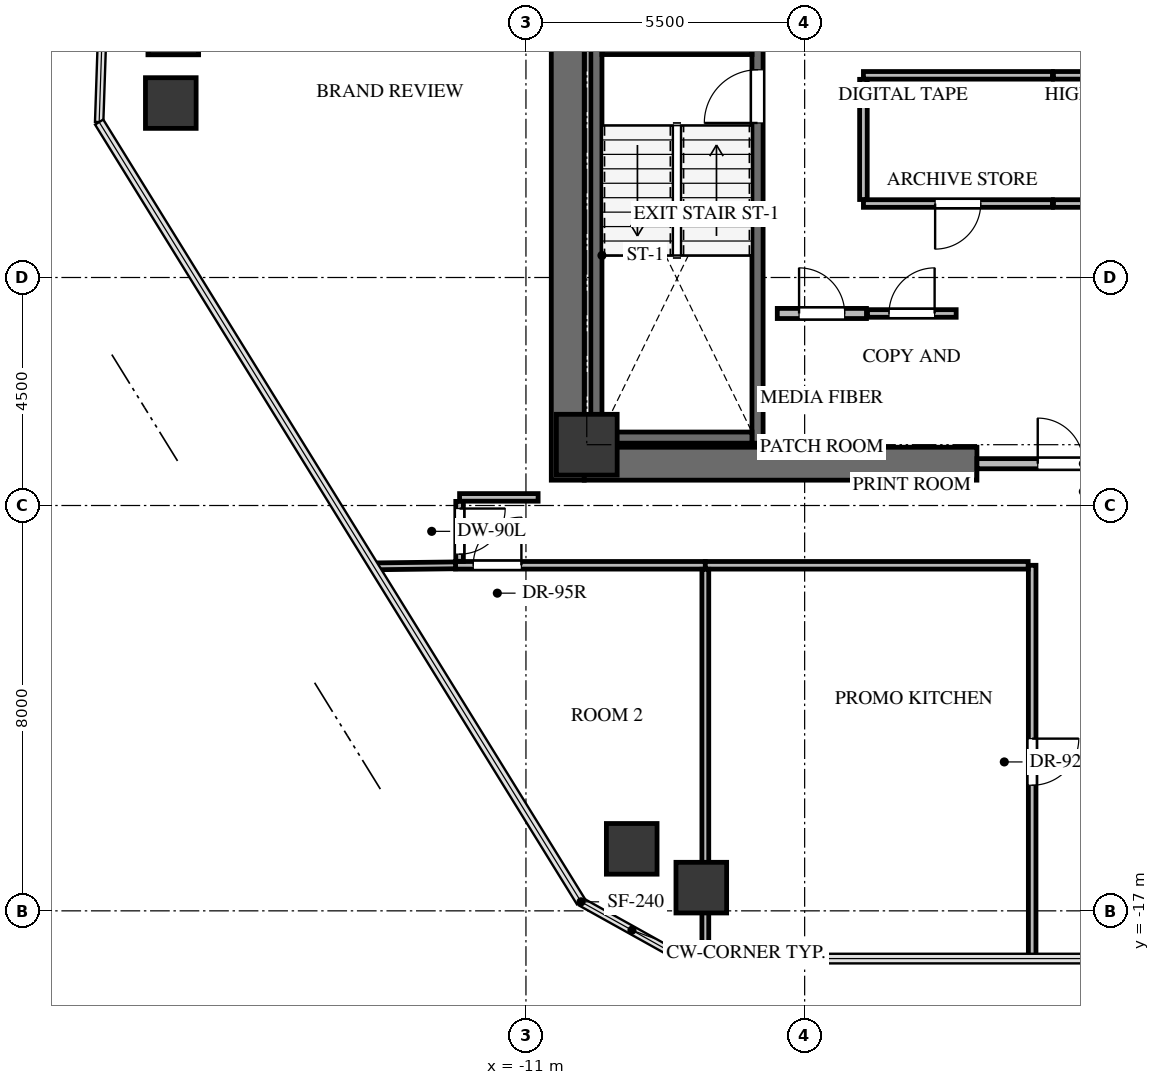
"""IFC4 building model, lengths in metres.
Left out: names, types, materials, properties, quantities, classifications, styles, units other than length and angle.
Written with IfcOpenShell. Run it as: python <this file> out.ifc"""

import sys

from ifc_helpers import new_model, si_unit, direction, frame, frame_2d, origin, origin_2d, place, context, subcontext, project, spatial, rectangle, extrude, source, transform, mapped, element, fill, save


model = new_model("IFC4")
c1 = context("Model", 3, precision=1e-05, world=origin(), true_north=direction((0.0, 1.0)))
c2 = subcontext(c1, "Body", "Model", "MODEL_VIEW")
j1 = project(units=[si_unit("LENGTHUNIT", "METRE"), si_unit("PLANEANGLEUNIT", "RADIAN")], contexts=[c1])
p1 = place(None, origin())
s1 = spatial("IfcSite", under=j1, at=p1, CompositionType="ELEMENT")
p2 = place(p1, origin())
s2 = spatial("IfcBuilding", under=s1, at=p2, CompositionType="ELEMENT")
p3 = place(p2, frame((0.0, 0.0, 193.6)))
s3 = spatial("IfcBuildingStorey", under=s2, at=p3, CompositionType="ELEMENT", Elevation=193.6)
p4 = place(p3, frame((-10.175, -8.5, 0.0), z_axis=(0.0, 0.0, 1.0), x_axis=(0.0, 1.0, 0.0)))
e1 = element("IfcWall", 1, at=p4, inside=s3, PredefinedType="SHEAR", context=c2, shape_type="SweptSolid", body=[
    extrude(rectangle(XDim=17.0, YDim=0.65, at=frame_2d((8.5, 0.0))), origin(), (0.0, 0.0, 1.0), 3.3),
])
p5 = place(p3, frame((-9.85, -8.175, 0.0), z_axis=(0.0, 0.0, 1.0), x_axis=(1.0, 0.0, 0.0)))
e2 = element("IfcWall", 2, at=p5, inside=s3, PredefinedType="SHEAR", context=c2, shape_type="SweptSolid", body=[
    extrude(rectangle(XDim=7.75, YDim=0.65, at=frame_2d((3.875, 0.0))), origin(), (0.0, 0.0, 1.0), 3.3),
])
p6 = place(p3, frame((-6.43, -7.77, -0.24), z_axis=(0.0, 0.0, 1.0), x_axis=(0.0, 1.0, 0.0)))
e3 = element("IfcWall", 3, at=p6, inside=s3, PredefinedType="SHEAR", context=c2, shape_type="SweptSolid", body=[
    extrude(rectangle(XDim=7.89, YDim=0.22, at=frame_2d((3.945, 0.0))), origin(), (0.0, 0.0, 1.0), 3.3),
])
p7 = place(p6, frame((6.32, 0.0, 0.0)))
e4 = element("IfcOpeningElement", 4, at=p7, cuts=e3, PredefinedType="OPENING", context=c2, shape_type="SweptSolid", body=[
    extrude(rectangle(XDim=1.05, YDim=2.15, at=frame_2d((0.525, 1.075))), frame((0.0, 0.12, 0.0), z_axis=(0.0, -1.0, 0.0), x_axis=(1.0, 0.0, 0.0)), (0.0, 0.0, 1.0), 0.24),
])
p8 = place(p3, frame((-9.61, 0.12, -0.24), z_axis=(0.0, 0.0, 1.0), x_axis=(0.0, -1.0, 0.0)))
e5 = element("IfcWall", 5, at=p8, inside=s3, PredefinedType="SHEAR", context=c2, shape_type="SweptSolid", body=[
    extrude(rectangle(XDim=7.89, YDim=0.22, at=frame_2d((3.945, 0.0))), origin(), (0.0, 0.0, 1.0), 3.3),
])
for number, where, z_axis, x_axis in (
    (6, (-9.5, -7.66, -0.24), (0.0, 0.0, 1.0), (1.0, 0.0, 0.0)),
    (7, (-6.54, 0.01, -0.24), (0.0, 0.0, 1.0), (-1.0, 0.0, 0.0)),
):
    element("IfcWall", number, at=place(p3, frame(where, z_axis=z_axis, x_axis=x_axis)), inside=s3, PredefinedType="SHEAR", context=c2, shape_type="SweptSolid", body=[
        extrude(rectangle(XDim=2.96, YDim=0.22, at=frame_2d((1.48, 0.0))), origin(), (0.0, 0.0, 1.0), 3.3),
    ])
m1 = source(origin(), c2, "Body", "SweptSolid", [
    extrude(rectangle(XDim=1.2, YDim=1.2, at=origin_2d()), origin(), (0.0, 0.0, 1.0), 3.3),
])
p9 = place(p3, frame((-9.8, -7.8, -0.24), z_axis=(0.0, 0.0, 1.0), x_axis=(1.0, 0.0, 0.0)))
e8 = element("IfcColumn", 8, at=p9, inside=s3, PredefinedType="COLUMN", context=c2, shape_type="MappedRepresentation", body=[
    mapped(m1, transform((0.0, 0.0, 0.0), x_axis=(1.0, 0.0, 0.0), y_axis=(0.0, 1.0, 0.0), z_axis=(0.0, 0.0, 1.0), scale=1.0)),
])
m2 = source(origin(), c2, "Body", "SweptSolid", [
    extrude(rectangle(XDim=1.0, YDim=1.0, at=origin_2d()), origin(), (0.0, 0.0, 1.0), 3.3),
])
for number, where, z_axis, x_axis in (
    (9, (-8.913, -15.776, -0.24), (0.0, 0.0, 1.0), (1.0, 0.0, 0.0)),
    (10, (-18.009, -1.057, -0.24), (0.0, 0.0, 1.0), (1.0, 0.0, 0.0)),
    (11, (-17.96, 0.396, -0.24), (0.0, 0.0, 1.0), (1.0, 0.0, 0.0)),
    (12, (-7.54, -16.542, -0.24), (0.0, 0.0, 1.0), (1.0, 0.0, 0.0)),
):
    element("IfcColumn", number, at=place(p3, frame(where, z_axis=z_axis, x_axis=x_axis)), inside=s3, PredefinedType="COLUMN", context=c2, shape_type="MappedRepresentation", body=[
        mapped(m2, transform((0.0, 0.0, 0.0), x_axis=(1.0, 0.0, 0.0), y_axis=(0.0, 1.0, 0.0), z_axis=(0.0, 0.0, 1.0), scale=1.0)),
    ])
p10 = place(p3, frame((-2.1, -8.175, 0.0), z_axis=(0.0, 0.0, 1.0), x_axis=(1.0, 0.0, 0.0)))
e13 = element("IfcWall", 13, at=p10, inside=s3, PredefinedType="SOLIDWALL", context=c2, shape_type="SweptSolid", body=[
    extrude(rectangle(XDim=4.2, YDim=0.2, at=frame_2d((2.1, 0.0))), origin(), (0.0, 0.0, 1.0), 3.045),
])
p11 = place(p10, frame((1.2, 0.0, 0.0)))
e14 = element("IfcOpeningElement", 14, at=p11, cuts=e13, PredefinedType="OPENING", context=c2, shape_type="SweptSolid", body=[
    extrude(rectangle(XDim=1.8, YDim=2.15, at=frame_2d((0.9, 1.075))), frame((0.0, 0.11, 0.0), z_axis=(0.0, -1.0, 0.0), x_axis=(1.0, 0.0, 0.0)), (0.0, 0.0, 1.0), 0.22),
])
p12 = place(p3, frame((-6.04, -5.21, 0.0), z_axis=(0.0, 0.0, 1.0), x_axis=(1.0, 0.0, 0.0)))
e15 = element("IfcWall", 15, at=p12, inside=s3, PredefinedType="SOLIDWALL", context=c2, shape_type="SweptSolid", body=[
    extrude(rectangle(XDim=1.76, YDim=0.2, at=frame_2d((0.88, 0.0))), origin(), (0.0, 0.0, 1.0), 3.045),
])
p13 = place(p12, frame((0.43, 0.0, 0.0)))
e16 = element("IfcOpeningElement", 16, at=p13, cuts=e15, PredefinedType="OPENING", context=c2, shape_type="SweptSolid", body=[
    extrude(rectangle(XDim=0.9, YDim=2.05, at=frame_2d((0.45, 1.025))), frame((0.0, 0.11, 0.0), z_axis=(0.0, -1.0, 0.0), x_axis=(1.0, 0.0, 0.0)), (0.0, 0.0, 1.0), 0.22),
])
p14 = place(p3, frame((-4.26, -5.21, 0.0), z_axis=(0.0, 0.0, 1.0), x_axis=(1.0, 0.0, 0.0)))
e17 = element("IfcWall", 17, at=p14, inside=s3, PredefinedType="PARTITIONING", context=c2, shape_type="SweptSolid", body=[
    extrude(rectangle(XDim=1.75, YDim=0.15, at=frame_2d((0.875, 0.0))), origin(), (0.0, 0.0, 1.0), 3.045),
])
p15 = place(p14, frame((0.425, 0.0, 0.0)))
e18 = element("IfcOpeningElement", 18, at=p15, cuts=e17, PredefinedType="OPENING", context=c2, shape_type="SweptSolid", body=[
    extrude(rectangle(XDim=0.9, YDim=2.05, at=frame_2d((0.45, 1.025))), frame((0.0, 0.085, 0.0), z_axis=(0.0, -1.0, 0.0), x_axis=(1.0, 0.0, 0.0)), (0.0, 0.0, 1.0), 0.17),
])
p16 = place(p3, frame((-0.61, -3.04, 0.0), z_axis=(0.0, 0.0, 1.0), x_axis=(-1.0, 0.0, 0.0)))
e19 = element("IfcWall", 19, at=p16, inside=s3, PredefinedType="PARTITIONING", context=c2, shape_type="SweptSolid", body=[
    extrude(rectangle(XDim=3.73, YDim=0.15, at=frame_2d((1.865, 0.0))), origin(), (0.0, 0.0, 1.0), 3.045),
])
p17 = place(p16, frame((1.415, 0.0, 0.0)))
e20 = element("IfcOpeningElement", 20, at=p17, cuts=e19, PredefinedType="OPENING", context=c2, shape_type="SweptSolid", body=[
    extrude(rectangle(XDim=0.9, YDim=2.05, at=frame_2d((0.45, 1.025))), frame((0.0, 0.085, 0.0), z_axis=(0.0, -1.0, 0.0), x_axis=(1.0, 0.0, 0.0)), (0.0, 0.0, 1.0), 0.17),
])
p18 = place(p3, frame((-4.34, -0.51, 0.0), z_axis=(0.0, 0.0, 1.0), x_axis=(1.0, 0.0, 0.0)))
e21 = element("IfcWall", 21, at=p18, inside=s3, PredefinedType="PARTITIONING", context=c2, shape_type="SweptSolid", body=[
    extrude(rectangle(XDim=3.73, YDim=0.15, at=frame_2d((1.865, 0.0))), origin(), (0.0, 0.0, 1.0), 3.045),
])
p19 = place(p3, frame((-4.34, -2.961, 0.0), z_axis=(0.0, 0.0, 1.0), x_axis=(0.0, 1.0, 0.0)))
e22 = element("IfcWall", 22, at=p19, inside=s3, PredefinedType="PARTITIONING", context=c2, shape_type="SweptSolid", body=[
    extrude(rectangle(XDim=2.372, YDim=0.15, at=frame_2d((1.186, 0.0))), origin(), (0.0, 0.0, 1.0), 3.045),
])
p20 = place(p3, frame((3.14, -3.04, 0.0), z_axis=(0.0, 0.0, 1.0), x_axis=(-1.0, 0.0, 0.0)))
e23 = element("IfcWall", 23, at=p20, inside=s3, PredefinedType="PARTITIONING", context=c2, shape_type="SweptSolid", body=[
    extrude(rectangle(XDim=3.73, YDim=0.15, at=frame_2d((1.865, 0.0))), origin(), (0.0, 0.0, 1.0), 3.045),
])
p21 = place(p20, frame((1.415, 0.0, 0.0)))
e24 = element("IfcOpeningElement", 24, at=p21, cuts=e23, PredefinedType="OPENING", context=c2, shape_type="SweptSolid", body=[
    extrude(rectangle(XDim=0.9, YDim=2.05, at=frame_2d((0.45, 1.025))), frame((0.0, 0.085, 0.0), z_axis=(0.0, -1.0, 0.0), x_axis=(1.0, 0.0, 0.0)), (0.0, 0.0, 1.0), 0.17),
])
p22 = place(p3, frame((-0.59, -0.51, 0.0), z_axis=(0.0, 0.0, 1.0), x_axis=(1.0, 0.0, 0.0)))
e25 = element("IfcWall", 25, at=p22, inside=s3, PredefinedType="PARTITIONING", context=c2, shape_type="SweptSolid", body=[
    extrude(rectangle(XDim=3.73, YDim=0.15, at=frame_2d((1.865, 0.0))), origin(), (0.0, 0.0, 1.0), 3.045),
])
p23 = place(p3, frame((-12.39, -10.18, 0.0), z_axis=(0.0, 0.0, 1.0), x_axis=(1.0, 0.0, 0.0)))
e26 = element("IfcWall", 26, at=p23, inside=s3, PredefinedType="PARTITIONING", context=c2, shape_type="SweptSolid", body=[
    extrude(rectangle(XDim=4.93, YDim=0.15, at=frame_2d((2.465, 0.0))), origin(), (0.0, 0.0, 1.0), 2.399),
])
p24 = place(p23, frame((0.35, 0.0, 0.0)))
e27 = element("IfcOpeningElement", 27, at=p24, cuts=e26, PredefinedType="OPENING", context=c2, shape_type="SweptSolid", body=[
    extrude(rectangle(XDim=0.95, YDim=2.1, at=frame_2d((0.475, 1.05))), frame((0.0, 0.085, 0.0), z_axis=(0.0, -1.0, 0.0), x_axis=(1.0, 0.0, 0.0)), (0.0, 0.0, 1.0), 0.17),
])
p25 = place(p3, frame((-1.01, -10.18, 0.0), z_axis=(0.0, 0.0, 1.0), x_axis=(0.0, -1.0, 0.0)))
e28 = element("IfcWall", 28, at=p25, inside=s3, PredefinedType="PARTITIONING", context=c2, shape_type="SweptSolid", body=[
    extrude(rectangle(XDim=7.762, YDim=0.15, at=frame_2d((3.881, 0.0))), origin(), (0.0, 0.0, 1.0), 2.399),
])
p26 = place(p25, frame((3.421, 0.0, 0.0)))
e29 = element("IfcOpeningElement", 29, at=p26, cuts=e28, PredefinedType="OPENING", context=c2, shape_type="SweptSolid", body=[
    extrude(rectangle(XDim=0.92, YDim=2.1, at=frame_2d((0.46, 1.05))), frame((0.0, 0.085, 0.0), z_axis=(0.0, -1.0, 0.0), x_axis=(1.0, 0.0, 0.0)), (0.0, 0.0, 1.0), 0.17),
])
p27 = place(p3, frame((-7.46, -10.18, 0.0), z_axis=(0.0, 0.0, 1.0), x_axis=(1.0, 0.0, 0.0)))
e30 = element("IfcWall", 30, at=p27, inside=s3, PredefinedType="PARTITIONING", context=c2, shape_type="SweptSolid", body=[
    extrude(rectangle(XDim=6.371, YDim=0.15, at=frame_2d((3.186, 0.0))), origin(), (0.0, 0.0, 1.0), 2.242),
])
p28 = place(p3, frame((-10.76, -8.84, 0.0), z_axis=(0.0, 0.0, 1.0), x_axis=(-1.0, 0.0, 0.0)))
e31 = element("IfcWall", 31, at=p28, inside=s3, PredefinedType="PARTITIONING", context=c2, shape_type="SweptSolid", body=[
    extrude(rectangle(XDim=1.55, YDim=0.15, at=frame_2d((0.775, 0.0))), origin(), (0.0, 0.0, 1.0), 3.045),
])
p29 = place(p3, frame((-12.31, -8.919, 0.0), z_axis=(0.0, 0.0, 1.0), x_axis=(0.0, -1.0, 0.0)))
e32 = element("IfcWall", 32, at=p29, inside=s3, PredefinedType="PARTITIONING", context=c2, shape_type="SweptSolid", body=[
    extrude(rectangle(XDim=1.182, YDim=0.15, at=frame_2d((0.591, 0.0))), origin(), (0.0, 0.0, 1.0), 2.399),
])
p30 = place(p29, frame((0.141, 0.0, 0.0)))
e33 = element("IfcOpeningElement", 33, at=p30, cuts=e32, PredefinedType="OPENING", context=c2, shape_type="SweptSolid", body=[
    extrude(rectangle(XDim=0.9, YDim=2.05, at=frame_2d((0.45, 1.025))), frame((0.0, 0.085, 0.0), z_axis=(0.0, -1.0, 0.0), x_axis=(1.0, 0.0, 0.0)), (0.0, 0.0, 1.0), 0.17),
])
p31 = place(p3, frame((-7.46, -10.259, 0.0), z_axis=(0.0, 0.0, 1.0), x_axis=(0.0, -1.0, 0.0)))
e34 = element("IfcWall", 34, at=p31, inside=s3, PredefinedType="PARTITIONING", context=c2, shape_type="SweptSolid", body=[
    extrude(rectangle(XDim=6.367, YDim=0.135, at=frame_2d((3.184, 0.0))), origin(), (0.0, 0.0, 1.0), 2.242),
])
p32 = place(p3, frame((-7.46, -16.626, 0.0), z_axis=(0.0, 0.0, 1.0), x_axis=(0.0, -1.0, 0.0)))
e35 = element("IfcWall", 35, at=p32, inside=s3, PredefinedType="PARTITIONING", context=c2, shape_type="SweptSolid", body=[
    extrude(rectangle(XDim=1.316, YDim=0.135, at=frame_2d((0.658, 0.0))), origin(), (0.0, 0.0, 1.0), 1.877),
])
p33 = place(p3, frame((-14.004, -10.201, 0.0), z_axis=(0.0, 0.0, 1.0), x_axis=(0.999923084603, 0.012402615782, 0.0)))
e36 = element("IfcWall", 36, at=p33, inside=s3, PredefinedType="PARTITIONING", context=c2, shape_type="SweptSolid", body=[
    extrude(rectangle(XDim=1.614, YDim=0.135, at=frame_2d((0.807, 0.0))), origin(), (0.0, 0.0, 1.0), 2.399),
])
m3 = source(origin(), c2, "Body", "SweptSolid", [
    extrude(rectangle(XDim=1.05, YDim=2.15, at=frame_2d((0.525, 1.075))), frame((0.0, 0.025, 0.0), z_axis=(0.0, -1.0, 0.0), x_axis=(1.0, 0.0, 0.0)), (0.0, 0.0, 1.0), 0.05),
])
p34 = place(p7, origin())
e37 = element("IfcDoor", 37, at=p34, inside=s3, OperationType="SINGLE_SWING_LEFT", PredefinedType="DOOR", context=c2, shape_type="MappedRepresentation", body=[
    mapped(m3, transform((0.0, 0.0, 0.0), x_axis=(1.0, 0.0, 0.0), y_axis=(0.0, 1.0, 0.0), z_axis=(0.0, 0.0, 1.0), scale=1.0)),
])
fill(e4, e37)
m4 = source(origin(), c2, "Body", "SweptSolid", [
    extrude(rectangle(XDim=1.8, YDim=2.15, at=frame_2d((0.9, 1.075))), frame((0.0, 0.025, 0.0), z_axis=(0.0, -1.0, 0.0), x_axis=(1.0, 0.0, 0.0)), (0.0, 0.0, 1.0), 0.05),
])
p35 = place(p11, origin())
e38 = element("IfcDoor", 38, at=p35, inside=s3, OperationType="DOUBLE_DOOR_SINGLE_SWING", PredefinedType="DOOR", context=c2, shape_type="MappedRepresentation", body=[
    mapped(m4, transform((0.0, 0.0, 0.0), x_axis=(1.0, 0.0, 0.0), y_axis=(0.0, 1.0, 0.0), z_axis=(0.0, 0.0, 1.0), scale=1.0)),
])
fill(e14, e38)
m5 = source(origin(), c2, "Body", "SweptSolid", [
    extrude(rectangle(XDim=0.9, YDim=2.05, at=frame_2d((0.45, 1.025))), frame((0.0, 0.025, 0.0), z_axis=(0.0, -1.0, 0.0), x_axis=(1.0, 0.0, 0.0)), (0.0, 0.0, 1.0), 0.05),
])
p36 = place(p13, origin())
e39 = element("IfcDoor", 39, at=p36, inside=s3, OperationType="SINGLE_SWING_LEFT", PredefinedType="DOOR", context=c2, shape_type="MappedRepresentation", body=[
    mapped(m5, transform((0.0, 0.0, 0.0), x_axis=(1.0, 0.0, 0.0), y_axis=(0.0, 1.0, 0.0), z_axis=(0.0, 0.0, 1.0), scale=1.0)),
])
fill(e16, e39)
m6 = source(origin(), c2, "Body", "SweptSolid", [
    extrude(rectangle(XDim=0.9, YDim=2.05, at=frame_2d((0.45, 1.025))), frame((0.0, 0.025, 0.0), z_axis=(0.0, -1.0, 0.0), x_axis=(1.0, 0.0, 0.0)), (0.0, 0.0, 1.0), 0.05),
])
p37 = place(p15, origin())
e40 = element("IfcDoor", 40, at=p37, inside=s3, OperationType="SINGLE_SWING_RIGHT", PredefinedType="DOOR", context=c2, shape_type="MappedRepresentation", body=[
    mapped(m6, transform((0.0, 0.0, 0.0), x_axis=(1.0, 0.0, 0.0), y_axis=(0.0, 1.0, 0.0), z_axis=(0.0, 0.0, 1.0), scale=1.0)),
])
fill(e18, e40)
p38 = place(p17, origin())
e41 = element("IfcDoor", 41, at=p38, inside=s3, OperationType="SINGLE_SWING_RIGHT", PredefinedType="DOOR", context=c2, shape_type="MappedRepresentation", body=[
    mapped(m6, transform((0.0, 0.0, 0.0), x_axis=(1.0, 0.0, 0.0), y_axis=(0.0, 1.0, 0.0), z_axis=(0.0, 0.0, 1.0), scale=1.0)),
])
fill(e20, e41)
m7 = source(origin(), c2, "Body", "SweptSolid", [
    extrude(rectangle(XDim=0.95, YDim=2.1, at=frame_2d((0.475, 1.05))), frame((0.0, 0.025, 0.0), z_axis=(0.0, -1.0, 0.0), x_axis=(1.0, 0.0, 0.0)), (0.0, 0.0, 1.0), 0.05),
])
p39 = place(p24, origin())
e42 = element("IfcDoor", 42, at=p39, inside=s3, OperationType="SINGLE_SWING_RIGHT", PredefinedType="DOOR", context=c2, shape_type="MappedRepresentation", body=[
    mapped(m7, transform((0.0, 0.0, 0.0), x_axis=(1.0, 0.0, 0.0), y_axis=(0.0, 1.0, 0.0), z_axis=(0.0, 0.0, 1.0), scale=1.0)),
])
fill(e27, e42)
m8 = source(origin(), c2, "Body", "SweptSolid", [
    extrude(rectangle(XDim=0.92, YDim=2.1, at=frame_2d((0.46, 1.05))), frame((0.0, 0.025, 0.0), z_axis=(0.0, -1.0, 0.0), x_axis=(1.0, 0.0, 0.0)), (0.0, 0.0, 1.0), 0.05),
])
p40 = place(p26, origin())
e43 = element("IfcDoor", 43, at=p40, inside=s3, OperationType="SINGLE_SWING_LEFT", PredefinedType="DOOR", context=c2, shape_type="MappedRepresentation", body=[
    mapped(m8, transform((0.0, 0.0, 0.0), x_axis=(1.0, 0.0, 0.0), y_axis=(0.0, 1.0, 0.0), z_axis=(0.0, 0.0, 1.0), scale=1.0)),
])
fill(e29, e43)
m9 = source(origin(), c2, "Body", "SweptSolid", [
    extrude(rectangle(XDim=0.9, YDim=2.05, at=frame_2d((0.45, 1.025))), frame((0.0, 0.025, 0.0), z_axis=(0.0, -1.0, 0.0), x_axis=(1.0, 0.0, 0.0)), (0.0, 0.0, 1.0), 0.05),
])
p41 = place(p30, origin())
e44 = element("IfcDoor", 44, at=p41, inside=s3, OperationType="SINGLE_SWING_LEFT", PredefinedType="DOOR", context=c2, shape_type="MappedRepresentation", body=[
    mapped(m9, transform((0.0, 0.0, 0.0), x_axis=(1.0, 0.0, 0.0), y_axis=(0.0, 1.0, 0.0), z_axis=(0.0, 0.0, 1.0), scale=1.0)),
])
fill(e33, e44)
save(model, sys.argv[1])
